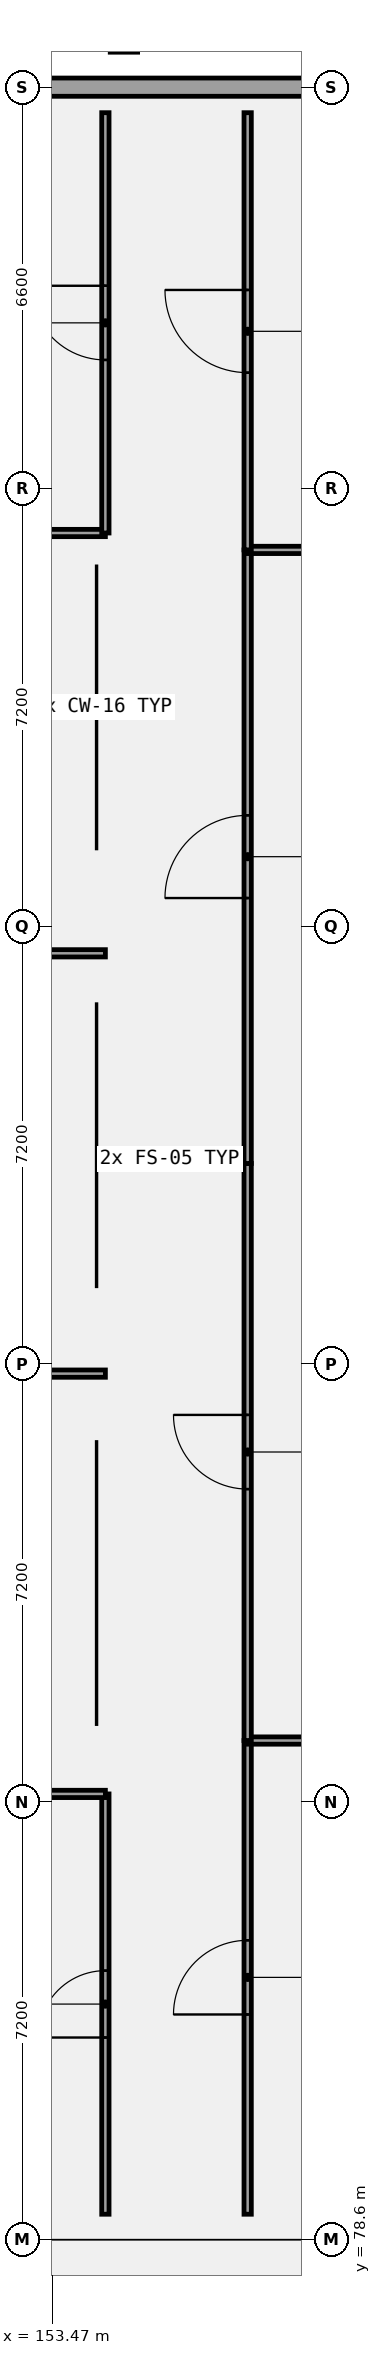
"""IFC4 building model, lengths in metres.
Left out: names, types, materials, properties, quantities, classifications, styles, units other than length and angle.
Written with IfcOpenShell. Run it as: python <this file> out.ifc"""

import sys

from ifc_helpers import new_model, si_unit, direction, frame, frame_2d, origin, origin_2d, place, context, subcontext, project, spatial, rectangle, extrude, element, fill, save


model = new_model("IFC4")
c1 = context("Model", 3, precision=1e-05, world=origin(), true_north=direction((0.0, 1.0)))
c2 = subcontext(c1, "Body", "Model", "MODEL_VIEW")
j1 = project(units=[si_unit("LENGTHUNIT", "METRE"), si_unit("PLANEANGLEUNIT", "RADIAN")], contexts=[c1])
p1 = place(None, origin())
s1 = spatial("IfcSite", under=j1, at=p1, CompositionType="ELEMENT")
p2 = place(p1, origin())
s2 = spatial("IfcBuilding", under=s1, at=p2, CompositionType="ELEMENT")
p3 = place(p2, frame((0.0, 0.0, 13.8)))
s3 = spatial("IfcBuildingStorey", under=s2, at=p3, CompositionType="ELEMENT", Elevation=13.8)
p4 = place(p3, frame((154.65, 114.95, 0.0), z_axis=(0.0, 0.0, 1.0), x_axis=(1.0, 0.0, 0.0)))
e1 = element("IfcColumn", 1, at=p4, inside=s3, PredefinedType="PILASTER", context=c2, shape_type="SweptSolid", body=[
    extrude(rectangle(XDim=0.45, YDim=0.75, at=origin_2d()), origin(), (0.0, 0.0, 1.0), 4.2),
])
p5 = place(p3, frame((166.35, 114.0, 0.0), z_axis=(0.0, 0.0, 1.0), x_axis=(-1.0, 0.0, 0.0)))
e2 = element("IfcWall", 2, at=p5, inside=s3, PredefinedType="SOLIDWALL", context=c2, shape_type="SweptSolid", body=[
    extrude(rectangle(XDim=21.9, YDim=0.3, at=frame_2d((10.95, 0.0))), origin(), (0.0, 0.0, 1.0), 3.19),
])
p6 = place(p5, frame((17.35, 0.0, 0.95)))
e3 = element("IfcOpeningElement", 3, at=p6, cuts=e2, PredefinedType="OPENING", context=c2, shape_type="SweptSolid", body=[
    extrude(rectangle(XDim=1.6, YDim=1.4, at=frame_2d((0.8, 0.7))), frame((0.0, 0.16, 0.0), z_axis=(0.0, -1.0, 0.0), x_axis=(1.0, 0.0, 0.0)), (0.0, 0.0, 1.0), 0.32),
])
p7 = place(p3, frame((154.345, 79.02, 0.0), z_axis=(0.0, 0.0, 1.0), x_axis=(0.0, 1.0, 0.0)))
e4 = element("IfcWall", 4, at=p7, inside=s3, PredefinedType="PARTITIONING", context=c2, shape_type="SweptSolid", body=[
    extrude(rectangle(XDim=6.912, YDim=0.12, at=frame_2d((3.456, 0.0))), origin(), (0.0, 0.0, 1.0), 3.94),
])
p8 = place(p7, frame((2.906, 0.0, 0.0)))
e5 = element("IfcOpeningElement", 5, at=p8, cuts=e4, PredefinedType="OPENING", context=c2, shape_type="SweptSolid", body=[
    extrude(rectangle(XDim=1.1, YDim=2.35, at=frame_2d((0.55, 1.175))), frame((0.0, 0.07, 0.0), z_axis=(0.0, -1.0, 0.0), x_axis=(1.0, 0.0, 0.0)), (0.0, 0.0, 1.0), 0.14),
])
p9 = place(p3, frame((145.25, 85.932, 0.0), z_axis=(0.0, 0.0, 1.0), x_axis=(1.0, 0.0, 0.0)))
e6 = element("IfcWall", 6, at=p9, inside=s3, PredefinedType="PARTITIONING", context=c2, shape_type="SweptSolid", body=[
    extrude(rectangle(XDim=9.095, YDim=0.12, at=frame_2d((4.547, 0.0))), origin(), (0.0, 0.0, 1.0), 3.29),
])
p10 = place(p3, frame((145.25, 92.844, 0.0), z_axis=(0.0, 0.0, 1.0), x_axis=(1.0, 0.0, 0.0)))
e7 = element("IfcWall", 7, at=p10, inside=s3, PredefinedType="PARTITIONING", context=c2, shape_type="SweptSolid", body=[
    extrude(rectangle(XDim=9.095, YDim=0.12, at=frame_2d((4.547, 0.0))), origin(), (0.0, 0.0, 1.0), 3.19),
])
for number, where, z_axis, x_axis in (
    (8, (145.25, 99.756, 0.0), (0.0, 0.0, 1.0), (1.0, 0.0, 0.0)),
    (9, (145.25, 106.668, 0.0), (0.0, 0.0, 1.0), (1.0, 0.0, 0.0)),
):
    element("IfcWall", number, at=place(p3, frame(where, z_axis=z_axis, x_axis=x_axis)), inside=s3, PredefinedType="PARTITIONING", context=c2, shape_type="SweptSolid", body=[
        extrude(rectangle(XDim=9.095, YDim=0.12, at=frame_2d((4.547, 0.0))), origin(), (0.0, 0.0, 1.0), 3.94),
    ])
p11 = place(p3, frame((154.345, 106.668, 0.0), z_axis=(0.0, 0.0, 1.0), x_axis=(0.0, 1.0, 0.0)))
e10 = element("IfcWall", 10, at=p11, inside=s3, PredefinedType="PARTITIONING", context=c2, shape_type="SweptSolid", body=[
    extrude(rectangle(XDim=6.912, YDim=0.12, at=frame_2d((3.456, 0.0))), origin(), (0.0, 0.0, 1.0), 3.94),
])
p12 = place(p11, frame((2.846, 0.0, 0.0)))
e11 = element("IfcOpeningElement", 11, at=p12, cuts=e10, PredefinedType="OPENING", context=c2, shape_type="SweptSolid", body=[
    extrude(rectangle(XDim=1.22, YDim=2.1, at=frame_2d((0.61, 1.05))), frame((0.0, 0.07, 0.0), z_axis=(0.0, -1.0, 0.0), x_axis=(1.0, 0.0, 0.0)), (0.0, 0.0, 1.0), 0.14),
])
p13 = place(p3, frame((156.685, 79.02, 0.0), z_axis=(0.0, 0.0, 1.0), x_axis=(0.0, 1.0, 0.0)))
e12 = element("IfcWall", 12, at=p13, inside=s3, PredefinedType="PARTITIONING", context=c2, shape_type="SweptSolid", body=[
    extrude(rectangle(XDim=7.79, YDim=0.12, at=frame_2d((3.895, 0.0))), origin(), (0.0, 0.0, 1.0), 3.94),
])
p14 = place(p13, frame((3.285, 0.0, 0.0)))
e13 = element("IfcOpeningElement", 13, at=p14, cuts=e12, PredefinedType="OPENING", context=c2, shape_type="SweptSolid", body=[
    extrude(rectangle(XDim=1.22, YDim=2.22, at=frame_2d((0.61, 1.11))), frame((0.0, 0.07, 0.0), z_axis=(0.0, -1.0, 0.0), x_axis=(1.0, 0.0, 0.0)), (0.0, 0.0, 1.0), 0.14),
])
p15 = place(p3, frame((156.685, 86.81, 0.0), z_axis=(0.0, 0.0, 1.0), x_axis=(1.0, 0.0, 0.0)))
e14 = element("IfcWall", 14, at=p15, inside=s3, PredefinedType="PARTITIONING", context=c2, shape_type="SweptSolid", body=[
    extrude(rectangle(XDim=9.335, YDim=0.12, at=frame_2d((4.667, 0.0))), origin(), (0.0, 0.0, 1.0), 3.94),
])
p16 = place(p3, frame((156.685, 86.81, 0.0), z_axis=(0.0, 0.0, 1.0), x_axis=(0.0, 1.0, 0.0)))
e15 = element("IfcWall", 15, at=p16, inside=s3, PredefinedType="PARTITIONING", context=c2, shape_type="SweptSolid", body=[
    extrude(rectangle(XDim=9.49, YDim=0.12, at=frame_2d((4.745, 0.0))), origin(), (0.0, 0.0, 1.0), 3.94),
])
p17 = place(p16, frame((4.135, 0.0, 0.0)))
e16 = element("IfcOpeningElement", 16, at=p17, cuts=e15, PredefinedType="OPENING", context=c2, shape_type="SweptSolid", body=[
    extrude(rectangle(XDim=1.22, YDim=2.35, at=frame_2d((0.61, 1.175))), frame((0.0, 0.07, 0.0), z_axis=(0.0, -1.0, 0.0), x_axis=(1.0, 0.0, 0.0)), (0.0, 0.0, 1.0), 0.14),
])
p18 = place(p3, frame((156.685, 96.3, 0.0), z_axis=(0.0, 0.0, 1.0), x_axis=(0.0, 1.0, 0.0)))
e17 = element("IfcWall", 17, at=p18, inside=s3, PredefinedType="PARTITIONING", context=c2, shape_type="SweptSolid", body=[
    extrude(rectangle(XDim=10.09, YDim=0.12, at=frame_2d((5.045, 0.0))), origin(), (0.0, 0.0, 1.0), 3.94),
])
p19 = place(p18, frame((4.365, 0.0, 0.0)))
e18 = element("IfcOpeningElement", 18, at=p19, cuts=e17, PredefinedType="OPENING", context=c2, shape_type="SweptSolid", body=[
    extrude(rectangle(XDim=1.36, YDim=2.1, at=frame_2d((0.68, 1.05))), frame((0.0, 0.07, 0.0), z_axis=(0.0, -1.0, 0.0), x_axis=(1.0, 0.0, 0.0)), (0.0, 0.0, 1.0), 0.14),
])
p20 = place(p3, frame((156.685, 106.39, 0.0), z_axis=(0.0, 0.0, 1.0), x_axis=(1.0, 0.0, 0.0)))
e19 = element("IfcWall", 19, at=p20, inside=s3, PredefinedType="PARTITIONING", context=c2, shape_type="SweptSolid", body=[
    extrude(rectangle(XDim=9.335, YDim=0.12, at=frame_2d((4.667, 0.0))), origin(), (0.0, 0.0, 1.0), 3.94),
])
p21 = place(p3, frame((156.685, 106.39, 0.0), z_axis=(0.0, 0.0, 1.0), x_axis=(0.0, 1.0, 0.0)))
e20 = element("IfcWall", 20, at=p21, inside=s3, PredefinedType="PARTITIONING", context=c2, shape_type="SweptSolid", body=[
    extrude(rectangle(XDim=7.19, YDim=0.12, at=frame_2d((3.595, 0.0))), origin(), (0.0, 0.0, 1.0), 3.94),
])
p22 = place(p21, frame((2.915, 0.0, 0.0)))
e21 = element("IfcOpeningElement", 21, at=p22, cuts=e20, PredefinedType="OPENING", context=c2, shape_type="SweptSolid", body=[
    extrude(rectangle(XDim=1.36, YDim=2.22, at=frame_2d((0.68, 1.11))), frame((0.0, 0.07, 0.0), z_axis=(0.0, -1.0, 0.0), x_axis=(1.0, 0.0, 0.0)), (0.0, 0.0, 1.0), 0.14),
])
p23 = place(p8, frame((1.1, 0.0, 0.0), z_axis=(0.0, 0.0, 1.0), x_axis=(-1.0, 0.0, 0.0)))
e22 = element("IfcDoor", 22, at=p23, inside=s3, OperationType="SINGLE_SWING_LEFT", PredefinedType="DOOR", context=c2, shape_type="SweptSolid", body=[
    extrude(rectangle(XDim=1.1, YDim=2.35, at=frame_2d((0.55, 1.175))), frame((0.0, 0.025, 0.0), z_axis=(0.0, -1.0, 0.0), x_axis=(1.0, 0.0, 0.0)), (0.0, 0.0, 1.0), 0.05),
])
fill(e5, e22)
p24 = place(p12, frame((1.22, 0.0, 0.0), z_axis=(0.0, 0.0, 1.0), x_axis=(-1.0, 0.0, 0.0)))
e23 = element("IfcDoor", 23, at=p24, inside=s3, OperationType="SINGLE_SWING_RIGHT", PredefinedType="DOOR", context=c2, shape_type="SweptSolid", body=[
    extrude(rectangle(XDim=1.22, YDim=2.1, at=frame_2d((0.61, 1.05))), frame((0.0, 0.025, 0.0), z_axis=(0.0, -1.0, 0.0), x_axis=(1.0, 0.0, 0.0)), (0.0, 0.0, 1.0), 0.05),
])
fill(e11, e23)
p25 = place(p14, origin())
e24 = element("IfcDoor", 24, at=p25, inside=s3, OperationType="SINGLE_SWING_LEFT", PredefinedType="DOOR", context=c2, shape_type="SweptSolid", body=[
    extrude(rectangle(XDim=1.22, YDim=2.22, at=frame_2d((0.61, 1.11))), frame((0.0, 0.025, 0.0), z_axis=(0.0, -1.0, 0.0), x_axis=(1.0, 0.0, 0.0)), (0.0, 0.0, 1.0), 0.05),
])
fill(e13, e24)
p26 = place(p17, origin())
e25 = element("IfcDoor", 25, at=p26, inside=s3, OperationType="SINGLE_SWING_RIGHT", PredefinedType="DOOR", context=c2, shape_type="SweptSolid", body=[
    extrude(rectangle(XDim=1.22, YDim=2.35, at=frame_2d((0.61, 1.175))), frame((0.0, 0.025, 0.0), z_axis=(0.0, -1.0, 0.0), x_axis=(1.0, 0.0, 0.0)), (0.0, 0.0, 1.0), 0.05),
])
fill(e16, e25)
p27 = place(p19, origin())
e26 = element("IfcDoor", 26, at=p27, inside=s3, OperationType="SINGLE_SWING_LEFT", PredefinedType="DOOR", context=c2, shape_type="SweptSolid", body=[
    extrude(rectangle(XDim=1.36, YDim=2.1, at=frame_2d((0.68, 1.05))), frame((0.0, 0.025, 0.0), z_axis=(0.0, -1.0, 0.0), x_axis=(1.0, 0.0, 0.0)), (0.0, 0.0, 1.0), 0.05),
])
fill(e18, e26)
p28 = place(p22, origin())
e27 = element("IfcDoor", 27, at=p28, inside=s3, OperationType="SINGLE_SWING_RIGHT", PredefinedType="DOOR", context=c2, shape_type="SweptSolid", body=[
    extrude(rectangle(XDim=1.36, YDim=2.22, at=frame_2d((0.68, 1.11))), frame((0.0, 0.025, 0.0), z_axis=(0.0, -1.0, 0.0), x_axis=(1.0, 0.0, 0.0)), (0.0, 0.0, 1.0), 0.05),
])
fill(e21, e27)
save(model, sys.argv[1])
